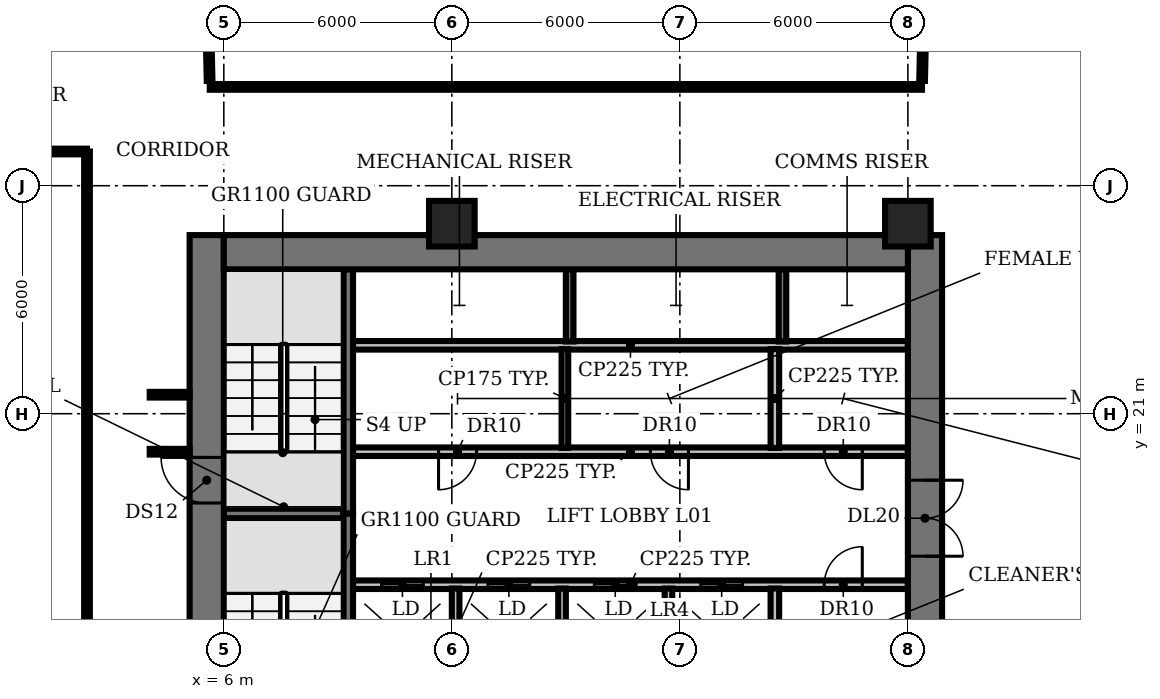
"""IFC4 building model, lengths in metres.
Left out: names, types, materials, properties, quantities, classifications, styles, units other than length and angle.
Written with IfcOpenShell. Run it as: python <this file> out.ifc"""

import sys

from ifc_helpers import new_model, si_unit, direction, frame, frame_2d, origin, origin_2d, place, context, subcontext, project, spatial, rectangle, extrude, element, fill, save


model = new_model("IFC4")
c1 = context("Model", 3, precision=1e-05, world=origin(), true_north=direction((0.0, 1.0)))
c2 = subcontext(c1, "Body", "Model", "MODEL_VIEW")
j1 = project(units=[si_unit("LENGTHUNIT", "METRE"), si_unit("PLANEANGLEUNIT", "RADIAN")], contexts=[c1])
p1 = place(None, origin())
s1 = spatial("IfcSite", under=j1, at=p1, CompositionType="ELEMENT")
p2 = place(p1, origin())
s2 = spatial("IfcBuilding", under=s1, at=p2, CompositionType="ELEMENT")
p3 = place(p2, frame((0.0, 0.0, 6.0)))
s3 = spatial("IfcBuildingStorey", under=s2, at=p3, CompositionType="ELEMENT", Elevation=6.0)
for number, where, z_axis, x_axis in (
    (1, (12.0, 26.0, 0.0), (0.0, 0.0, 1.0), (1.0, 0.0, 0.0)),
    (2, (24.0, 26.0, 0.0), (0.0, 0.0, 1.0), (1.0, 0.0, 0.0)),
):
    element("IfcColumn", number, at=place(p3, frame(where, z_axis=z_axis, x_axis=x_axis)), inside=s3, PredefinedType="COLUMN", context=c2, shape_type="SweptSolid", body=[
        extrude(rectangle(XDim=1.2, YDim=1.2, at=origin_2d()), origin(), (0.0, 0.0, 1.0), 4.6),
    ])
p4 = place(p3, frame((9.4, 16.5, 0.0), z_axis=(0.0, 0.0, 1.0), x_axis=(1.0, 0.0, 0.0)))
e3 = element("IfcWall", 3, at=p4, inside=s3, PredefinedType="PARTITIONING", context=c2, shape_type="SweptSolid", body=[
    extrude(rectangle(XDim=14.6, YDim=0.225, at=frame_2d((7.3, 0.0))), origin(), (0.0, 0.0, 1.0), 4.6),
])
p5 = place(p4, frame((0.75, 0.0, 0.0)))
e4 = element("IfcOpeningElement", 4, at=p5, cuts=e3, PredefinedType="OPENING", context=c2, shape_type="SweptSolid", body=[
    extrude(rectangle(XDim=1.1, YDim=2.1, at=frame_2d((0.55, 1.05))), frame((0.0, 0.123, 0.0), z_axis=(0.0, -1.0, 0.0), x_axis=(1.0, 0.0, 0.0)), (0.0, 0.0, 1.0), 0.245),
])
p6 = place(p4, frame((3.55, 0.0, 0.0)))
e5 = element("IfcOpeningElement", 5, at=p6, cuts=e3, PredefinedType="OPENING", context=c2, shape_type="SweptSolid", body=[
    extrude(rectangle(XDim=1.1, YDim=2.1, at=frame_2d((0.55, 1.05))), frame((0.0, 0.123, 0.0), z_axis=(0.0, -1.0, 0.0), x_axis=(1.0, 0.0, 0.0)), (0.0, 0.0, 1.0), 0.245),
])
p7 = place(p4, frame((6.35, 0.0, 0.0)))
e6 = element("IfcOpeningElement", 6, at=p7, cuts=e3, PredefinedType="OPENING", context=c2, shape_type="SweptSolid", body=[
    extrude(rectangle(XDim=1.1, YDim=2.1, at=frame_2d((0.55, 1.05))), frame((0.0, 0.123, 0.0), z_axis=(0.0, -1.0, 0.0), x_axis=(1.0, 0.0, 0.0)), (0.0, 0.0, 1.0), 0.245),
])
p8 = place(p4, frame((9.15, 0.0, 0.0)))
e7 = element("IfcOpeningElement", 7, at=p8, cuts=e3, PredefinedType="OPENING", context=c2, shape_type="SweptSolid", body=[
    extrude(rectangle(XDim=1.1, YDim=2.1, at=frame_2d((0.55, 1.05))), frame((0.0, 0.123, 0.0), z_axis=(0.0, -1.0, 0.0), x_axis=(1.0, 0.0, 0.0)), (0.0, 0.0, 1.0), 0.245),
])
p9 = place(p4, frame((12.4, 0.0, 0.0)))
e8 = element("IfcOpeningElement", 8, at=p9, cuts=e3, PredefinedType="OPENING", context=c2, shape_type="SweptSolid", body=[
    extrude(rectangle(XDim=1.0, YDim=2.1, at=frame_2d((0.5, 1.05))), frame((0.0, 0.123, 0.0), z_axis=(0.0, -1.0, 0.0), x_axis=(1.0, 0.0, 0.0)), (0.0, 0.0, 1.0), 0.245),
])
p10 = place(p3, frame((6.0, 18.375, 0.0), z_axis=(0.0, 0.0, 1.0), x_axis=(1.0, 0.0, 0.0)))
e9 = element("IfcWall", 9, at=p10, inside=s3, PredefinedType="SHEAR", context=c2, shape_type="SweptSolid", body=[
    extrude(rectangle(XDim=3.15, YDim=0.25, at=frame_2d((1.575, 0.0))), origin(), (0.0, 0.0, 1.0), 4.6),
])
p11 = place(p3, frame((24.0, 20.0, 0.0), z_axis=(0.0, 0.0, 1.0), x_axis=(-1.0, 0.0, 0.0)))
e10 = element("IfcWall", 10, at=p11, inside=s3, PredefinedType="PARTITIONING", context=c2, shape_type="SweptSolid", body=[
    extrude(rectangle(XDim=14.6, YDim=0.225, at=frame_2d((7.3, 0.0))), origin(), (0.0, 0.0, 1.0), 4.6),
])
p12 = place(p11, frame((11.35, 0.0, 0.0)))
e11 = element("IfcOpeningElement", 11, at=p12, cuts=e10, PredefinedType="OPENING", context=c2, shape_type="SweptSolid", body=[
    extrude(rectangle(XDim=1.0, YDim=2.1, at=frame_2d((0.5, 1.05))), frame((0.0, 0.123, 0.0), z_axis=(0.0, -1.0, 0.0), x_axis=(1.0, 0.0, 0.0)), (0.0, 0.0, 1.0), 0.245),
])
p13 = place(p11, frame((5.775, 0.0, 0.0)))
e12 = element("IfcOpeningElement", 12, at=p13, cuts=e10, PredefinedType="OPENING", context=c2, shape_type="SweptSolid", body=[
    extrude(rectangle(XDim=1.0, YDim=2.1, at=frame_2d((0.5, 1.05))), frame((0.0, 0.123, 0.0), z_axis=(0.0, -1.0, 0.0), x_axis=(1.0, 0.0, 0.0)), (0.0, 0.0, 1.0), 0.245),
])
p14 = place(p11, frame((1.2, 0.0, 0.0)))
e13 = element("IfcOpeningElement", 13, at=p14, cuts=e10, PredefinedType="OPENING", context=c2, shape_type="SweptSolid", body=[
    extrude(rectangle(XDim=1.0, YDim=2.1, at=frame_2d((0.5, 1.05))), frame((0.0, 0.123, 0.0), z_axis=(0.0, -1.0, 0.0), x_axis=(1.0, 0.0, 0.0)), (0.0, 0.0, 1.0), 0.245),
])
p15 = place(p3, frame((9.4, 22.8, 0.0), z_axis=(0.0, 0.0, 1.0), x_axis=(1.0, 0.0, 0.0)))
e14 = element("IfcWall", 14, at=p15, inside=s3, PredefinedType="PARTITIONING", context=c2, shape_type="SweptSolid", body=[
    extrude(rectangle(XDim=14.6, YDim=0.225, at=frame_2d((7.3, 0.0))), origin(), (0.0, 0.0, 1.0), 4.6),
])
p16 = place(p3, frame((9.275, 18.375, 0.0), z_axis=(0.0, 0.0, 1.0), x_axis=(0.0, -1.0, 0.0)))
e15 = element("IfcWall", 15, at=p16, inside=s3, PredefinedType="SHEAR", context=c2, shape_type="SweptSolid", body=[
    extrude(rectangle(XDim=6.55, YDim=0.25, at=frame_2d((3.275, 0.0))), origin(), (0.0, 0.0, 1.0), 4.6),
])
p17 = place(p16, frame((5.075, 0.0, 0.0)))
e16 = element("IfcOpeningElement", 16, at=p17, cuts=e15, PredefinedType="OPENING", context=c2, shape_type="SweptSolid", body=[
    extrude(rectangle(XDim=1.0, YDim=2.1, at=frame_2d((0.5, 1.05))), frame((0.0, 0.135, 0.0), z_axis=(0.0, -1.0, 0.0), x_axis=(1.0, 0.0, 0.0)), (0.0, 0.0, 1.0), 0.27),
])
p18 = place(p3, frame((9.275, 18.375, 0.0), z_axis=(0.0, 0.0, 1.0), x_axis=(0.0, 1.0, 0.0)))
e17 = element("IfcWall", 17, at=p18, inside=s3, PredefinedType="SHEAR", context=c2, shape_type="SweptSolid", body=[
    extrude(rectangle(XDim=6.425, YDim=0.25, at=frame_2d((3.212, 0.0))), origin(), (0.0, 0.0, 1.0), 4.6),
])
for number, where, z_axis, x_axis in (
    (18, (12.1, 13.8, 0.0), (0.0, 0.0, 1.0), (0.0, 1.0, 0.0)),
    (19, (14.9, 13.8, 0.0), (0.0, 0.0, 1.0), (0.0, 1.0, 0.0)),
):
    element("IfcWall", number, at=place(p3, frame(where, z_axis=z_axis, x_axis=x_axis)), inside=s3, PredefinedType="SOLIDWALL", context=c2, shape_type="SweptSolid", body=[
        extrude(rectangle(XDim=2.6, YDim=0.2, at=frame_2d((1.3, 0.0))), origin(), (0.0, 0.0, 1.0), 4.6),
    ])
p19 = place(p3, frame((14.975, 20.1, 0.0), z_axis=(0.0, 0.0, 1.0), x_axis=(0.0, 1.0, 0.0)))
e20 = element("IfcWall", 20, at=p19, inside=s3, PredefinedType="PARTITIONING", context=c2, shape_type="SweptSolid", body=[
    extrude(rectangle(XDim=2.6, YDim=0.175, at=frame_2d((1.3, 0.0))), origin(), (0.0, 0.0, 1.0), 4.6),
])
p20 = place(p3, frame((15.1, 22.9, 0.0), z_axis=(0.0, 0.0, 1.0), x_axis=(0.0, 1.0, 0.0)))
e21 = element("IfcWall", 21, at=p20, inside=s3, PredefinedType="SHEAR", context=c2, shape_type="SweptSolid", body=[
    extrude(rectangle(XDim=1.9, YDim=0.2, at=frame_2d((0.95, 0.0))), origin(), (0.0, 0.0, 1.0), 4.6),
])
p21 = place(p3, frame((17.7, 13.8, 0.0), z_axis=(0.0, 0.0, 1.0), x_axis=(0.0, 1.0, 0.0)))
e22 = element("IfcWall", 22, at=p21, inside=s3, PredefinedType="SOLIDWALL", context=c2, shape_type="SweptSolid", body=[
    extrude(rectangle(XDim=2.6, YDim=0.2, at=frame_2d((1.3, 0.0))), origin(), (0.0, 0.0, 1.0), 4.6),
])
for number, where, z_axis, x_axis in (
    (23, (20.5, 13.8, 0.0), (0.0, 0.0, 1.0), (0.0, 1.0, 0.0)),
    (24, (20.5, 20.1, 0.0), (0.0, 0.0, 1.0), (0.0, 1.0, 0.0)),
):
    element("IfcWall", number, at=place(p3, frame(where, z_axis=z_axis, x_axis=x_axis)), inside=s3, PredefinedType="PARTITIONING", context=c2, shape_type="SweptSolid", body=[
        extrude(rectangle(XDim=2.6, YDim=0.225, at=frame_2d((1.3, 0.0))), origin(), (0.0, 0.0, 1.0), 4.6),
    ])
p22 = place(p3, frame((20.7, 22.9, 0.0), z_axis=(0.0, 0.0, 1.0), x_axis=(0.0, 1.0, 0.0)))
e25 = element("IfcWall", 25, at=p22, inside=s3, PredefinedType="SHEAR", context=c2, shape_type="SweptSolid", body=[
    extrude(rectangle(XDim=1.9, YDim=0.2, at=frame_2d((0.95, 0.0))), origin(), (0.0, 0.0, 1.0), 4.6),
])
p23 = place(p3, frame((5.55, 4.5, 0.0), z_axis=(0.0, 0.0, 1.0), x_axis=(0.0, 1.0, 0.0)))
e26 = element("IfcWall", 26, at=p23, inside=s3, PredefinedType="SHEAR", context=c2, shape_type="SweptSolid", body=[
    extrude(rectangle(XDim=21.2, YDim=0.9, at=frame_2d((10.6, 0.0))), origin(), (0.0, 0.0, 1.0), 4.6),
])
p24 = place(p23, frame((7.6, 0.0, 0.0)))
e27 = element("IfcOpeningElement", 27, at=p24, cuts=e26, PredefinedType="OPENING", context=c2, shape_type="SweptSolid", body=[
    extrude(rectangle(XDim=1.2, YDim=2.1, at=frame_2d((0.6, 1.05))), frame((0.0, 0.46, 0.0), z_axis=(0.0, -1.0, 0.0), x_axis=(1.0, 0.0, 0.0)), (0.0, 0.0, 1.0), 0.92),
])
p25 = place(p23, frame((14.15, 0.0, 0.0)))
e28 = element("IfcOpeningElement", 28, at=p25, cuts=e26, PredefinedType="OPENING", context=c2, shape_type="SweptSolid", body=[
    extrude(rectangle(XDim=1.2, YDim=2.1, at=frame_2d((0.6, 1.05))), frame((0.0, 0.46, 0.0), z_axis=(0.0, -1.0, 0.0), x_axis=(1.0, 0.0, 0.0)), (0.0, 0.0, 1.0), 0.92),
])
p26 = place(p3, frame((24.45, 25.7, 0.0), z_axis=(0.0, 0.0, 1.0), x_axis=(0.0, -1.0, 0.0)))
e29 = element("IfcWall", 29, at=p26, inside=s3, PredefinedType="SHEAR", context=c2, shape_type="SweptSolid", body=[
    extrude(rectangle(XDim=21.2, YDim=0.9, at=frame_2d((10.6, 0.0))), origin(), (0.0, 0.0, 1.0), 4.6),
])
p27 = place(p26, frame((12.45, 0.0, 0.0)))
e30 = element("IfcOpeningElement", 30, at=p27, cuts=e29, PredefinedType="OPENING", context=c2, shape_type="SweptSolid", body=[
    extrude(rectangle(XDim=0.9, YDim=2.1, at=frame_2d((0.45, 1.05))), frame((0.0, 0.46, 0.0), z_axis=(0.0, -1.0, 0.0), x_axis=(1.0, 0.0, 0.0)), (0.0, 0.0, 1.0), 0.92),
])
p28 = place(p26, frame((6.45, 0.0, 0.0)))
e31 = element("IfcOpeningElement", 31, at=p28, cuts=e29, PredefinedType="OPENING", context=c2, shape_type="SweptSolid", body=[
    extrude(rectangle(XDim=2.0, YDim=2.1, at=frame_2d((1.0, 1.05))), frame((0.0, 0.46, 0.0), z_axis=(0.0, -1.0, 0.0), x_axis=(1.0, 0.0, 0.0)), (0.0, 0.0, 1.0), 0.92),
])
p29 = place(p3, frame((6.0, 25.25, 0.0), z_axis=(0.0, 0.0, 1.0), x_axis=(1.0, 0.0, 0.0)))
e32 = element("IfcWall", 32, at=p29, inside=s3, PredefinedType="SHEAR", context=c2, shape_type="SweptSolid", body=[
    extrude(rectangle(XDim=18.0, YDim=0.9, at=frame_2d((9.0, 0.0))), origin(), (0.0, 0.0, 1.0), 4.6),
])
p30 = place(p3, frame((-3.7, 27.9, 0.0), z_axis=(0.0, 0.0, 1.0), x_axis=(1.0, 0.0, 0.0)))
e33 = element("IfcWall", 33, at=p30, inside=s3, PredefinedType="PARTITIONING", context=c2, shape_type="SweptSolid", body=[
    extrude(rectangle(XDim=6.1, YDim=0.15, at=frame_2d((3.05, 0.0))), origin(), (0.0, 0.0, 1.0), 3.18),
])
p31 = place(p3, frame((2.4, -4.5, 0.0), z_axis=(0.0, 0.0, 1.0), x_axis=(0.0, 1.0, 0.0)))
e34 = element("IfcWall", 34, at=p31, inside=s3, PredefinedType="PARTITIONING", context=c2, shape_type="SweptSolid", body=[
    extrude(rectangle(XDim=32.4, YDim=0.15, at=frame_2d((16.2, 0.0))), origin(), (0.0, 0.0, 1.0), 3.18),
])
for number, where, z_axis, x_axis in (
    (35, (4.05, 20.0, 0.0), (0.0, 0.0, 1.0), (1.0, 0.0, 0.0)),
    (36, (4.05, 21.5, 0.0), (0.0, 0.0, 1.0), (1.0, 0.0, 0.0)),
):
    element("IfcWall", number, at=place(p3, frame(where, z_axis=z_axis, x_axis=x_axis)), inside=s3, PredefinedType="PARTITIONING", context=c2, shape_type="SweptSolid", body=[
        extrude(rectangle(XDim=1.05, YDim=0.15, at=frame_2d((0.525, 0.0))), origin(), (0.0, 0.0, 1.0), 3.18),
    ])
p32 = place(p3, frame((5.6, 30.9, 0.0), z_axis=(0.0, 0.0, 1.0), x_axis=(0.022906193834, -0.99973761872, 0.0)))
e37 = element("IfcWall", 37, at=p32, inside=s3, PredefinedType="PARTITIONING", context=c2, shape_type="SweptSolid", body=[
    extrude(rectangle(XDim=1.14, YDim=0.15, at=frame_2d((0.57, 0.0))), origin(), (0.0, 0.0, 1.0), 3.18),
])
p33 = place(p3, frame((5.63, 29.6, 0.0), z_axis=(0.0, 0.0, 1.0), x_axis=(1.0, 0.0, 0.0)))
e38 = element("IfcWall", 38, at=p33, inside=s3, PredefinedType="PARTITIONING", context=c2, shape_type="SweptSolid", body=[
    extrude(rectangle(XDim=18.74, YDim=0.15, at=frame_2d((9.37, 0.0))), origin(), (0.0, 0.0, 1.0), 3.18),
])
p34 = place(p3, frame((24.374, 29.76, 0.0), z_axis=(0.0, 0.0, 1.0), x_axis=(0.022906193834, 0.99973761872, 0.0)))
e39 = element("IfcWall", 39, at=p34, inside=s3, PredefinedType="PARTITIONING", context=c2, shape_type="SweptSolid", body=[
    extrude(rectangle(XDim=1.14, YDim=0.15, at=frame_2d((0.57, 0.0))), origin(), (0.0, 0.0, 1.0), 3.18),
])
p35 = place(p5, origin())
e40 = element("IfcDoor", 40, at=p35, inside=s3, OperationType="DOUBLE_DOOR_SLIDING", PredefinedType="DOOR", context=c2, shape_type="SweptSolid", body=[
    extrude(rectangle(XDim=1.1, YDim=2.1, at=frame_2d((0.55, 1.05))), frame((0.0, 0.025, 0.0), z_axis=(0.0, -1.0, 0.0), x_axis=(1.0, 0.0, 0.0)), (0.0, 0.0, 1.0), 0.05),
])
fill(e4, e40)
p36 = place(p6, origin())
e41 = element("IfcDoor", 41, at=p36, inside=s3, OperationType="DOUBLE_DOOR_SLIDING", PredefinedType="DOOR", context=c2, shape_type="SweptSolid", body=[
    extrude(rectangle(XDim=1.1, YDim=2.1, at=frame_2d((0.55, 1.05))), frame((0.0, 0.025, 0.0), z_axis=(0.0, -1.0, 0.0), x_axis=(1.0, 0.0, 0.0)), (0.0, 0.0, 1.0), 0.05),
])
fill(e5, e41)
p37 = place(p7, origin())
e42 = element("IfcDoor", 42, at=p37, inside=s3, OperationType="DOUBLE_DOOR_SLIDING", PredefinedType="DOOR", context=c2, shape_type="SweptSolid", body=[
    extrude(rectangle(XDim=1.1, YDim=2.1, at=frame_2d((0.55, 1.05))), frame((0.0, 0.025, 0.0), z_axis=(0.0, -1.0, 0.0), x_axis=(1.0, 0.0, 0.0)), (0.0, 0.0, 1.0), 0.05),
])
fill(e6, e42)
p38 = place(p8, origin())
e43 = element("IfcDoor", 43, at=p38, inside=s3, OperationType="DOUBLE_DOOR_SLIDING", PredefinedType="DOOR", context=c2, shape_type="SweptSolid", body=[
    extrude(rectangle(XDim=1.1, YDim=2.1, at=frame_2d((0.55, 1.05))), frame((0.0, 0.025, 0.0), z_axis=(0.0, -1.0, 0.0), x_axis=(1.0, 0.0, 0.0)), (0.0, 0.0, 1.0), 0.05),
])
fill(e7, e43)
p39 = place(p9, origin())
e44 = element("IfcDoor", 44, at=p39, inside=s3, OperationType="SINGLE_SWING_RIGHT", PredefinedType="DOOR", context=c2, shape_type="SweptSolid", body=[
    extrude(rectangle(XDim=1.0, YDim=2.1, at=frame_2d((0.5, 1.05))), frame((0.0, 0.025, 0.0), z_axis=(0.0, -1.0, 0.0), x_axis=(1.0, 0.0, 0.0)), (0.0, 0.0, 1.0), 0.05),
])
fill(e8, e44)
p40 = place(p12, origin())
e45 = element("IfcDoor", 45, at=p40, inside=s3, OperationType="SINGLE_SWING_RIGHT", PredefinedType="DOOR", context=c2, shape_type="SweptSolid", body=[
    extrude(rectangle(XDim=1.0, YDim=2.1, at=frame_2d((0.5, 1.05))), frame((0.0, 0.025, 0.0), z_axis=(0.0, -1.0, 0.0), x_axis=(1.0, 0.0, 0.0)), (0.0, 0.0, 1.0), 0.05),
])
fill(e11, e45)
p41 = place(p13, origin())
e46 = element("IfcDoor", 46, at=p41, inside=s3, OperationType="SINGLE_SWING_LEFT", PredefinedType="DOOR", context=c2, shape_type="SweptSolid", body=[
    extrude(rectangle(XDim=1.0, YDim=2.1, at=frame_2d((0.5, 1.05))), frame((0.0, 0.025, 0.0), z_axis=(0.0, -1.0, 0.0), x_axis=(1.0, 0.0, 0.0)), (0.0, 0.0, 1.0), 0.05),
])
fill(e12, e46)
p42 = place(p14, origin())
e47 = element("IfcDoor", 47, at=p42, inside=s3, OperationType="SINGLE_SWING_LEFT", PredefinedType="DOOR", context=c2, shape_type="SweptSolid", body=[
    extrude(rectangle(XDim=1.0, YDim=2.1, at=frame_2d((0.5, 1.05))), frame((0.0, 0.025, 0.0), z_axis=(0.0, -1.0, 0.0), x_axis=(1.0, 0.0, 0.0)), (0.0, 0.0, 1.0), 0.05),
])
fill(e13, e47)
p43 = place(p25, origin())
e48 = element("IfcDoor", 48, at=p43, inside=s3, OperationType="SINGLE_SWING_RIGHT", PredefinedType="DOOR", context=c2, shape_type="SweptSolid", body=[
    extrude(rectangle(XDim=1.2, YDim=2.1, at=frame_2d((0.6, 1.05))), frame((0.0, 0.025, 0.0), z_axis=(0.0, -1.0, 0.0), x_axis=(1.0, 0.0, 0.0)), (0.0, 0.0, 1.0), 0.05),
])
fill(e28, e48)
p44 = place(p28, origin())
e49 = element("IfcDoor", 49, at=p44, inside=s3, OperationType="DOUBLE_DOOR_SINGLE_SWING", PredefinedType="DOOR", context=c2, shape_type="SweptSolid", body=[
    extrude(rectangle(XDim=2.0, YDim=2.1, at=frame_2d((1.0, 1.05))), frame((0.0, 0.025, 0.0), z_axis=(0.0, -1.0, 0.0), x_axis=(1.0, 0.0, 0.0)), (0.0, 0.0, 1.0), 0.05),
])
fill(e31, e49)
save(model, sys.argv[1])
